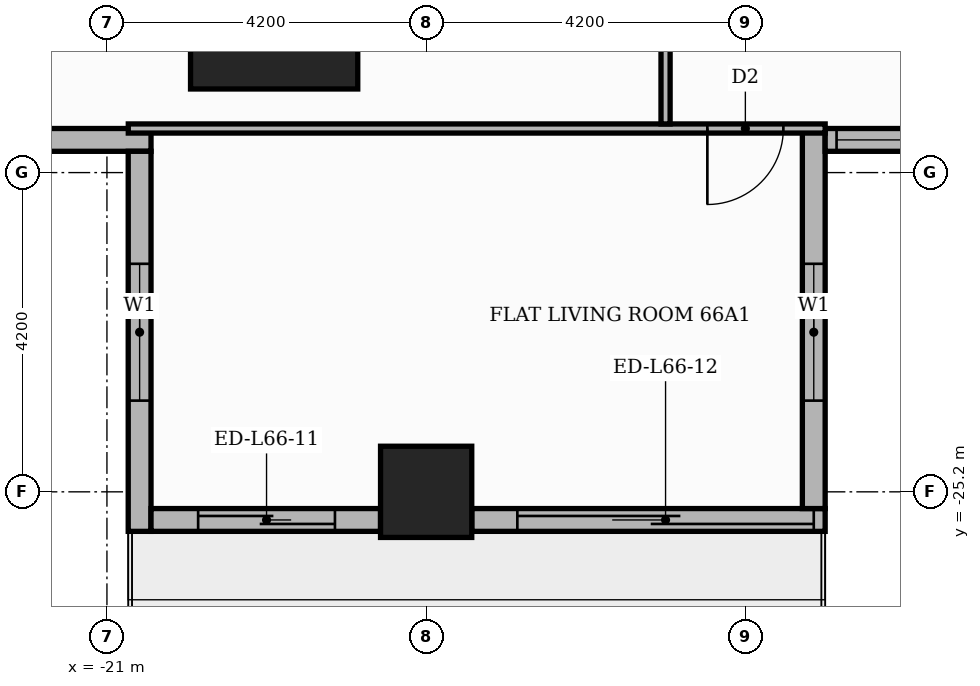
"""IFC4 building model, lengths in metres.
Left out: names, types, materials, properties, quantities, classifications, styles, units other than length and angle.
Written with IfcOpenShell. Run it as: python <this file> out.ifc"""

import sys

from ifc_helpers import new_model, si_unit, direction, frame, frame_2d, origin, origin_2d, place, context, subcontext, project, spatial, rectangle, extrude, element, fill, save


model = new_model("IFC4")
c1 = context("Model", 3, precision=1e-05, world=origin(), true_north=direction((0.0, 1.0)))
c2 = subcontext(c1, "Body", "Model", "MODEL_VIEW")
j1 = project(units=[si_unit("LENGTHUNIT", "METRE"), si_unit("PLANEANGLEUNIT", "RADIAN")], contexts=[c1])
p1 = place(None, origin())
s1 = spatial("IfcSite", under=j1, at=p1, CompositionType="ELEMENT")
p2 = place(p1, origin())
s2 = spatial("IfcBuilding", under=s1, at=p2, CompositionType="ELEMENT")
p3 = place(p2, frame((0.0, 0.0, 275.7)))
s3 = spatial("IfcBuildingStorey", under=s2, at=p3, CompositionType="ELEMENT", Elevation=275.7)
p4 = place(p3, frame((-18.8, -18.8, 0.0), z_axis=(0.0, 0.0, 1.0), x_axis=(1.0, 0.0, 0.0)))
e1 = element("IfcColumn", 1, at=p4, inside=s3, PredefinedType="COLUMN", context=c2, shape_type="SweptSolid", body=[
    extrude(rectangle(XDim=2.2, YDim=2.2, at=origin_2d()), origin(), (0.0, 0.0, 1.0), 3.9),
])
p5 = place(p3, frame((-16.8, -25.2, 0.0), z_axis=(0.0, 0.0, 1.0), x_axis=(1.0, 0.0, 0.0)))
e2 = element("IfcColumn", 2, at=p5, inside=s3, PredefinedType="COLUMN", context=c2, shape_type="SweptSolid", body=[
    extrude(rectangle(XDim=1.2, YDim=1.2, at=origin_2d()), origin(), (0.0, 0.0, 1.0), 3.9),
])
p6 = place(p3, frame((-25.42, -20.57, 0.0), z_axis=(0.0, 0.0, 1.0), x_axis=(1.0, 0.0, 0.0)))
e3 = element("IfcWall", 3, at=p6, inside=s3, PredefinedType="STANDARD", context=c2, shape_type="SweptSolid", body=[
    extrude(rectangle(XDim=5.0, YDim=0.3, at=frame_2d((2.5, 0.0))), origin(), (0.0, 0.0, 1.0), 3.48),
])
p7 = place(p6, frame((1.42, 0.0, 0.9)))
e4 = element("IfcOpeningElement", 4, at=p7, cuts=e3, PredefinedType="OPENING", context=c2, shape_type="SweptSolid", body=[
    extrude(rectangle(XDim=1.8, YDim=2.1, at=frame_2d((0.9, 1.05))), frame((0.0, 0.16, 0.0), z_axis=(0.0, -1.0, 0.0), x_axis=(1.0, 0.0, 0.0)), (0.0, 0.0, 1.0), 0.32),
])
p8 = place(p3, frame((-20.57, -20.72, 0.0), z_axis=(0.0, 0.0, 1.0), x_axis=(0.0, -1.0, 0.0)))
e5 = element("IfcWall", 5, at=p8, inside=s3, PredefinedType="STANDARD", context=c2, shape_type="SweptSolid", body=[
    extrude(rectangle(XDim=5.0, YDim=0.3, at=frame_2d((2.5, 0.0))), origin(), (0.0, 0.0, 1.0), 3.48),
])
p9 = place(p8, frame((1.48, 0.0, 0.9)))
e6 = element("IfcOpeningElement", 6, at=p9, cuts=e5, PredefinedType="OPENING", context=c2, shape_type="SweptSolid", body=[
    extrude(rectangle(XDim=1.8, YDim=2.1, at=frame_2d((0.9, 1.05))), frame((0.0, 0.16, 0.0), z_axis=(0.0, -1.0, 0.0), x_axis=(1.0, 0.0, 0.0)), (0.0, 0.0, 1.0), 0.32),
])
p10 = place(p3, frame((-20.42, -25.57, 0.0), z_axis=(0.0, 0.0, 1.0), x_axis=(1.0, 0.0, 0.0)))
e7 = element("IfcWall", 7, at=p10, inside=s3, PredefinedType="STANDARD", context=c2, shape_type="SweptSolid", body=[
    extrude(rectangle(XDim=3.02, YDim=0.3, at=frame_2d((1.51, 0.0))), origin(), (0.0, 0.0, 1.0), 3.48),
])
p11 = place(p10, frame((0.62, 0.0, 0.0)))
e8 = element("IfcOpeningElement", 8, at=p11, cuts=e7, PredefinedType="OPENING", context=c2, shape_type="SweptSolid", body=[
    extrude(rectangle(XDim=1.8, YDim=2.4, at=frame_2d((0.9, 1.2))), frame((0.0, 0.16, 0.0), z_axis=(0.0, -1.0, 0.0), x_axis=(1.0, 0.0, 0.0)), (0.0, 0.0, 1.0), 0.32),
])
p12 = place(p3, frame((-16.2, -25.57, 0.0), z_axis=(0.0, 0.0, 1.0), x_axis=(1.0, 0.0, 0.0)))
e9 = element("IfcWall", 9, at=p12, inside=s3, PredefinedType="STANDARD", context=c2, shape_type="SweptSolid", body=[
    extrude(rectangle(XDim=4.65, YDim=0.3, at=frame_2d((2.325, 0.0))), origin(), (0.0, 0.0, 1.0), 3.48),
])
p13 = place(p12, frame((0.6, 0.0, 0.0)))
e10 = element("IfcOpeningElement", 10, at=p13, cuts=e9, PredefinedType="OPENING", context=c2, shape_type="SweptSolid", body=[
    extrude(rectangle(XDim=3.9, YDim=2.4, at=frame_2d((1.95, 1.2))), frame((0.0, 0.16, 0.0), z_axis=(0.0, -1.0, 0.0), x_axis=(1.0, 0.0, 0.0)), (0.0, 0.0, 1.0), 0.32),
])
p14 = place(p3, frame((-11.7, -25.42, 0.0), z_axis=(0.0, 0.0, 1.0), x_axis=(0.0, 1.0, 0.0)))
e11 = element("IfcWall", 11, at=p14, inside=s3, PredefinedType="STANDARD", context=c2, shape_type="SweptSolid", body=[
    extrude(rectangle(XDim=5.0, YDim=0.3, at=frame_2d((2.5, 0.0))), origin(), (0.0, 0.0, 1.0), 3.48),
])
p15 = place(p14, frame((1.42, 0.0, 0.9)))
e12 = element("IfcOpeningElement", 12, at=p15, cuts=e11, PredefinedType="OPENING", context=c2, shape_type="SweptSolid", body=[
    extrude(rectangle(XDim=1.8, YDim=2.1, at=frame_2d((0.9, 1.05))), frame((0.0, 0.16, 0.0), z_axis=(0.0, -1.0, 0.0), x_axis=(1.0, 0.0, 0.0)), (0.0, 0.0, 1.0), 0.32),
])
p16 = place(p3, frame((-11.55, -20.57, 0.0), z_axis=(0.0, 0.0, 1.0), x_axis=(1.0, 0.0, 0.0)))
e13 = element("IfcWall", 13, at=p16, inside=s3, PredefinedType="STANDARD", context=c2, shape_type="SweptSolid", body=[
    extrude(rectangle(XDim=23.4, YDim=0.3, at=frame_2d((11.7, 0.0))), origin(), (0.0, 0.0, 1.0), 3.48),
])
p17 = place(p16, frame((0.15, 0.0, 0.9)))
e14 = element("IfcOpeningElement", 14, at=p17, cuts=e13, PredefinedType="OPENING", context=c2, shape_type="SweptSolid", body=[
    extrude(rectangle(XDim=6.0, YDim=2.1, at=frame_2d((3.0, 1.05))), frame((0.0, 0.16, 0.0), z_axis=(0.0, -1.0, 0.0), x_axis=(1.0, 0.0, 0.0)), (0.0, 0.0, 1.0), 0.32),
])
p18 = place(p16, frame((6.45, 0.0, 0.9)))
e15 = element("IfcOpeningElement", 15, at=p18, cuts=e13, PredefinedType="OPENING", context=c2, shape_type="SweptSolid", body=[
    extrude(rectangle(XDim=6.0, YDim=2.1, at=frame_2d((3.0, 1.05))), frame((0.0, 0.16, 0.0), z_axis=(0.0, -1.0, 0.0), x_axis=(1.0, 0.0, 0.0)), (0.0, 0.0, 1.0), 0.32),
])
p19 = place(p16, frame((12.75, 0.0, 0.9)))
e16 = element("IfcOpeningElement", 16, at=p19, cuts=e13, PredefinedType="OPENING", context=c2, shape_type="SweptSolid", body=[
    extrude(rectangle(XDim=6.0, YDim=2.1, at=frame_2d((3.0, 1.05))), frame((0.0, 0.16, 0.0), z_axis=(0.0, -1.0, 0.0), x_axis=(1.0, 0.0, 0.0)), (0.0, 0.0, 1.0), 0.32),
])
p20 = place(p16, frame((19.05, 0.0, 0.9)))
e17 = element("IfcOpeningElement", 17, at=p20, cuts=e13, PredefinedType="OPENING", context=c2, shape_type="SweptSolid", body=[
    extrude(rectangle(XDim=3.9, YDim=2.1, at=frame_2d((1.95, 1.05))), frame((0.0, 0.16, 0.0), z_axis=(0.0, -1.0, 0.0), x_axis=(1.0, 0.0, 0.0)), (0.0, 0.0, 1.0), 0.32),
])
p21 = place(p3, frame((-20.719, -20.42, 0.0), z_axis=(0.0, 0.0, 1.0), x_axis=(1.0, 0.0, 0.0)))
e18 = element("IfcWall", 18, at=p21, inside=s3, PredefinedType="PARTITIONING", context=c2, shape_type="SweptSolid", body=[
    extrude(rectangle(XDim=9.169, YDim=0.12, at=frame_2d((4.584, 0.0))), origin(), (0.0, 0.0, 1.0), 3.48),
])
p22 = place(p21, frame((7.619, 0.0, 0.0)))
e19 = element("IfcOpeningElement", 19, at=p22, cuts=e18, PredefinedType="OPENING", context=c2, shape_type="SweptSolid", body=[
    extrude(rectangle(XDim=1.0, YDim=2.1, at=frame_2d((0.5, 1.05))), frame((0.0, 0.07, 0.0), z_axis=(0.0, -1.0, 0.0), x_axis=(1.0, 0.0, 0.0)), (0.0, 0.0, 1.0), 0.14),
])
p23 = place(p3, frame((-13.65, -20.36, 0.0), z_axis=(0.0, 0.0, 1.0), x_axis=(0.0, 1.0, 0.0)))
e20 = element("IfcWall", 20, at=p23, inside=s3, PredefinedType="PARTITIONING", context=c2, shape_type="SweptSolid", body=[
    extrude(rectangle(XDim=6.61, YDim=0.12, at=frame_2d((3.305, 0.0))), origin(), (0.0, 0.0, 1.0), 3.48),
])
p24 = place(p23, frame((2.875, 0.0, 0.0)))
e21 = element("IfcOpeningElement", 21, at=p24, cuts=e20, PredefinedType="OPENING", context=c2, shape_type="SweptSolid", body=[
    extrude(rectangle(XDim=0.9, YDim=2.1, at=frame_2d((0.45, 1.05))), frame((0.0, 0.07, 0.0), z_axis=(0.0, -1.0, 0.0), x_axis=(1.0, 0.0, 0.0)), (0.0, 0.0, 1.0), 0.14),
])
p25 = place(p9, origin())
e22 = element("IfcWindow", 22, at=p25, inside=s3, PartitioningType="SINGLE_PANEL", PredefinedType="WINDOW", context=c2, shape_type="SweptSolid", body=[
    extrude(rectangle(XDim=1.8, YDim=2.1, at=frame_2d((0.9, 1.05))), frame((0.0, 0.03, 0.0), z_axis=(0.0, -1.0, 0.0), x_axis=(1.0, 0.0, 0.0)), (0.0, 0.0, 1.0), 0.06),
])
fill(e6, e22)
p26 = place(p11, origin())
e23 = element("IfcDoor", 23, at=p26, inside=s3, OperationType="SLIDING_TO_RIGHT", PredefinedType="DOOR", context=c2, shape_type="SweptSolid", body=[
    extrude(rectangle(XDim=1.8, YDim=2.4, at=frame_2d((0.9, 1.2))), frame((0.0, 0.025, 0.0), z_axis=(0.0, -1.0, 0.0), x_axis=(1.0, 0.0, 0.0)), (0.0, 0.0, 1.0), 0.05),
])
fill(e8, e23)
p27 = place(p13, origin())
e24 = element("IfcDoor", 24, at=p27, inside=s3, OperationType="SLIDING_TO_LEFT", PredefinedType="DOOR", context=c2, shape_type="SweptSolid", body=[
    extrude(rectangle(XDim=3.9, YDim=2.4, at=frame_2d((1.95, 1.2))), frame((0.0, 0.025, 0.0), z_axis=(0.0, -1.0, 0.0), x_axis=(1.0, 0.0, 0.0)), (0.0, 0.0, 1.0), 0.05),
])
fill(e10, e24)
p28 = place(p15, origin())
e25 = element("IfcWindow", 25, at=p28, inside=s3, PartitioningType="SINGLE_PANEL", PredefinedType="WINDOW", context=c2, shape_type="SweptSolid", body=[
    extrude(rectangle(XDim=1.8, YDim=2.1, at=frame_2d((0.9, 1.05))), frame((0.0, 0.03, 0.0), z_axis=(0.0, -1.0, 0.0), x_axis=(1.0, 0.0, 0.0)), (0.0, 0.0, 1.0), 0.06),
])
fill(e12, e25)
p29 = place(p17, origin())
e26 = element("IfcWindow", 26, at=p29, inside=s3, PartitioningType="SINGLE_PANEL", PredefinedType="WINDOW", context=c2, shape_type="SweptSolid", body=[
    extrude(rectangle(XDim=6.0, YDim=2.1, at=frame_2d((3.0, 1.05))), frame((0.0, 0.03, 0.0), z_axis=(0.0, -1.0, 0.0), x_axis=(1.0, 0.0, 0.0)), (0.0, 0.0, 1.0), 0.06),
])
fill(e14, e26)
p30 = place(p22, frame((1.0, 0.0, 0.0), z_axis=(0.0, 0.0, 1.0), x_axis=(-1.0, 0.0, 0.0)))
e27 = element("IfcDoor", 27, at=p30, inside=s3, OperationType="SINGLE_SWING_LEFT", PredefinedType="DOOR", context=c2, shape_type="SweptSolid", body=[
    extrude(rectangle(XDim=1.0, YDim=2.1, at=frame_2d((0.5, 1.05))), frame((0.0, 0.025, 0.0), z_axis=(0.0, -1.0, 0.0), x_axis=(1.0, 0.0, 0.0)), (0.0, 0.0, 1.0), 0.05),
])
fill(e19, e27)
save(model, sys.argv[1])
